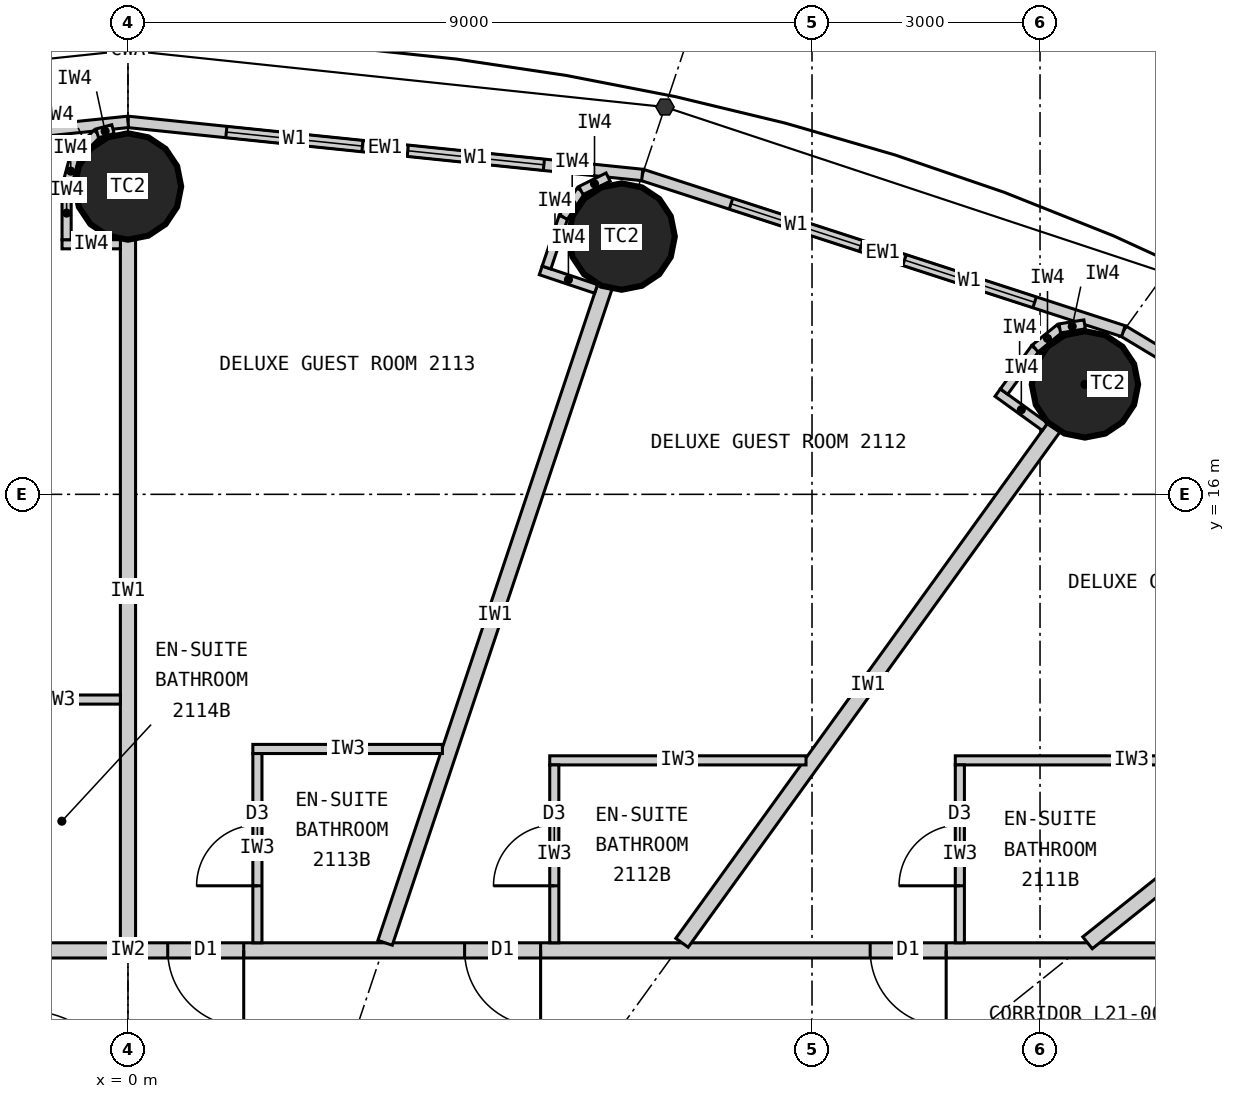
"""IFC4 building model, lengths in metres.
Left out: names, types, materials, properties, quantities, classifications, styles, units other than length and angle.
Written with IfcOpenShell. Run it as: python <this file> out.ifc"""

import sys

from ifc_helpers import new_model, si_unit, direction, frame, frame_2d, origin, origin_2d, place, context, subcontext, project, spatial, rectangle, circle, extrude, element, fill, save


model = new_model("IFC4")
c1 = context("Model", 3, precision=1e-05, world=origin(), true_north=direction((0.0, 1.0)))
c2 = subcontext(c1, "Body", "Model", "MODEL_VIEW")
j1 = project(units=[si_unit("LENGTHUNIT", "METRE"), si_unit("PLANEANGLEUNIT", "RADIAN")], contexts=[c1])
p1 = place(None, origin())
s1 = spatial("IfcSite", under=j1, at=p1, CompositionType="ELEMENT")
p2 = place(p1, origin())
s2 = spatial("IfcBuilding", under=s1, at=p2, CompositionType="ELEMENT")
p3 = place(p2, frame((0.0, 0.0, 83.7)))
s3 = spatial("IfcBuildingStorey", under=s2, at=p3, CompositionType="ELEMENT", Elevation=83.7)
for number, where, z_axis, x_axis in (
    (1, (12.591, 17.447, 0.0), (0.0, 0.0, 1.0), (1.0, 0.0, 0.0)),
    (2, (6.495, 19.391, 0.0), (0.0, 0.0, 1.0), (1.0, 0.0, 0.0)),
    (3, (0.0, 20.05, 0.0), (0.0, 0.0, 1.0), (1.0, 0.0, 0.0)),
):
    element("IfcColumn", number, at=place(p3, frame(where, z_axis=z_axis, x_axis=x_axis)), inside=s3, PredefinedType="COLUMN", context=c2, shape_type="SweptSolid", body=[
        extrude(circle(Radius=0.7, at=origin_2d()), origin(), (0.0, 0.0, 1.0), 3.3),
    ])
p4 = place(p3, frame((18.57, 14.856, 0.0), z_axis=(0.0, 0.0, 1.0), x_axis=(-0.856983180864, 0.515344377787, 0.0)))
e4 = element("IfcWall", 4, at=p4, inside=s3, PredefinedType="ELEMENTEDWALL", context=c2, shape_type="SweptSolid", body=[
    extrude(rectangle(XDim=6.386, YDim=0.15, at=frame_2d((3.193, 0.0))), origin(), (0.0, 0.0, 1.0), 3.12),
])
p5 = place(p4, frame((1.093, 0.0, 0.9)))
e5 = element("IfcOpeningElement", 5, at=p5, cuts=e4, PredefinedType="OPENING", context=c2, shape_type="SweptSolid", body=[
    extrude(rectangle(XDim=1.8, YDim=1.9, at=frame_2d((0.9, 0.95))), frame((0.0, 0.085, 0.0), z_axis=(0.0, -1.0, 0.0), x_axis=(1.0, 0.0, 0.0)), (0.0, 0.0, 1.0), 0.17),
])
p6 = place(p4, frame((3.493, 0.0, 0.9)))
e6 = element("IfcOpeningElement", 6, at=p6, cuts=e4, PredefinedType="OPENING", context=c2, shape_type="SweptSolid", body=[
    extrude(rectangle(XDim=1.8, YDim=1.9, at=frame_2d((0.9, 0.95))), frame((0.0, 0.085, 0.0), z_axis=(0.0, -1.0, 0.0), x_axis=(1.0, 0.0, 0.0)), (0.0, 0.0, 1.0), 0.17),
])
p7 = place(p3, frame((13.096, 18.147, 0.0), z_axis=(0.0, 0.0, 1.0), x_axis=(-0.951137534625, 0.308767534285, 0.0)))
e7 = element("IfcWall", 7, at=p7, inside=s3, PredefinedType="ELEMENTEDWALL", context=c2, shape_type="SweptSolid", body=[
    extrude(rectangle(XDim=6.655, YDim=0.15, at=frame_2d((3.328, 0.0))), origin(), (0.0, 0.0, 1.0), 3.12),
])
p8 = place(p7, frame((1.228, 0.0, 0.9)))
e8 = element("IfcOpeningElement", 8, at=p8, cuts=e7, PredefinedType="OPENING", context=c2, shape_type="SweptSolid", body=[
    extrude(rectangle(XDim=1.8, YDim=1.9, at=frame_2d((0.9, 0.95))), frame((0.0, 0.085, 0.0), z_axis=(0.0, -1.0, 0.0), x_axis=(1.0, 0.0, 0.0)), (0.0, 0.0, 1.0), 0.17),
])
p9 = place(p7, frame((3.628, 0.0, 0.9)))
e9 = element("IfcOpeningElement", 9, at=p9, cuts=e7, PredefinedType="OPENING", context=c2, shape_type="SweptSolid", body=[
    extrude(rectangle(XDim=1.8, YDim=1.9, at=frame_2d((0.9, 0.95))), frame((0.0, 0.085, 0.0), z_axis=(0.0, -1.0, 0.0), x_axis=(1.0, 0.0, 0.0)), (0.0, 0.0, 1.0), 0.17),
])
p10 = place(p3, frame((6.766, 20.202, 0.0), z_axis=(0.0, 0.0, 1.0), x_axis=(-0.994721394369, 0.102612609291, 0.0)))
e10 = element("IfcWall", 10, at=p10, inside=s3, PredefinedType="ELEMENTEDWALL", context=c2, shape_type="SweptSolid", body=[
    extrude(rectangle(XDim=6.802, YDim=0.15, at=frame_2d((3.401, 0.0))), origin(), (0.0, 0.0, 1.0), 3.12),
])
p11 = place(p10, frame((1.301, 0.0, 0.9)))
e11 = element("IfcOpeningElement", 11, at=p11, cuts=e10, PredefinedType="OPENING", context=c2, shape_type="SweptSolid", body=[
    extrude(rectangle(XDim=1.8, YDim=1.9, at=frame_2d((0.9, 0.95))), frame((0.0, 0.085, 0.0), z_axis=(0.0, -1.0, 0.0), x_axis=(1.0, 0.0, 0.0)), (0.0, 0.0, 1.0), 0.17),
])
p12 = place(p10, frame((3.701, 0.0, 0.9)))
e12 = element("IfcOpeningElement", 12, at=p12, cuts=e10, PredefinedType="OPENING", context=c2, shape_type="SweptSolid", body=[
    extrude(rectangle(XDim=1.8, YDim=1.9, at=frame_2d((0.9, 0.95))), frame((0.0, 0.085, 0.0), z_axis=(0.0, -1.0, 0.0), x_axis=(1.0, 0.0, 0.0)), (0.0, 0.0, 1.0), 0.17),
])
p13 = place(p3, frame((0.0, 20.9, 0.0), z_axis=(0.0, 0.0, 1.0), x_axis=(-0.994721394369, -0.102612609291, 0.0)))
e13 = element("IfcWall", 13, at=p13, inside=s3, PredefinedType="ELEMENTEDWALL", context=c2, shape_type="SweptSolid", body=[
    extrude(rectangle(XDim=6.802, YDim=0.15, at=frame_2d((3.401, 0.0))), origin(), (0.0, 0.0, 1.0), 3.12),
])
p14 = place(p13, frame((1.301, 0.0, 0.9)))
e14 = element("IfcOpeningElement", 14, at=p14, cuts=e13, PredefinedType="OPENING", context=c2, shape_type="SweptSolid", body=[
    extrude(rectangle(XDim=1.8, YDim=1.9, at=frame_2d((0.9, 0.95))), frame((0.0, 0.085, 0.0), z_axis=(0.0, -1.0, 0.0), x_axis=(1.0, 0.0, 0.0)), (0.0, 0.0, 1.0), 0.17),
])
p15 = place(p13, frame((3.701, 0.0, 0.9)))
e15 = element("IfcOpeningElement", 15, at=p15, cuts=e13, PredefinedType="OPENING", context=c2, shape_type="SweptSolid", body=[
    extrude(rectangle(XDim=1.8, YDim=1.9, at=frame_2d((0.9, 0.95))), frame((0.0, 0.085, 0.0), z_axis=(0.0, -1.0, 0.0), x_axis=(1.0, 0.0, 0.0)), (0.0, 0.0, 1.0), 0.17),
])
p16 = place(p3, frame((-14.1, 10.0, 0.0), z_axis=(0.0, 0.0, 1.0), x_axis=(1.0, 0.0, 0.0)))
e16 = element("IfcWall", 16, at=p16, inside=s3, PredefinedType="PARTITIONING", context=c2, shape_type="SweptSolid", body=[
    extrude(rectangle(XDim=28.2, YDim=0.2, at=frame_2d((14.1, 0.0))), origin(), (0.0, 0.0, 1.0), 3.12),
])
p17 = place(p16, frame((23.865, 0.0, 0.0)))
e17 = element("IfcOpeningElement", 17, at=p17, cuts=e16, PredefinedType="OPENING", context=c2, shape_type="SweptSolid", body=[
    extrude(rectangle(XDim=1.0, YDim=2.2, at=frame_2d((0.5, 1.1))), frame((0.0, 0.11, 0.0), z_axis=(0.0, -1.0, 0.0), x_axis=(1.0, 0.0, 0.0)), (0.0, 0.0, 1.0), 0.22),
])
p18 = place(p16, frame((18.529, 0.0, 0.0)))
e18 = element("IfcOpeningElement", 18, at=p18, cuts=e16, PredefinedType="OPENING", context=c2, shape_type="SweptSolid", body=[
    extrude(rectangle(XDim=1.0, YDim=2.2, at=frame_2d((0.5, 1.1))), frame((0.0, 0.11, 0.0), z_axis=(0.0, -1.0, 0.0), x_axis=(1.0, 0.0, 0.0)), (0.0, 0.0, 1.0), 0.22),
])
p19 = place(p16, frame((14.623, 0.0, 0.0)))
e19 = element("IfcOpeningElement", 19, at=p19, cuts=e16, PredefinedType="OPENING", context=c2, shape_type="SweptSolid", body=[
    extrude(rectangle(XDim=1.0, YDim=2.2, at=frame_2d((0.5, 1.1))), frame((0.0, 0.11, 0.0), z_axis=(0.0, -1.0, 0.0), x_axis=(1.0, 0.0, 0.0)), (0.0, 0.0, 1.0), 0.22),
])
p20 = place(p16, frame((11.24, 0.0, 0.0)))
e20 = element("IfcOpeningElement", 20, at=p20, cuts=e16, PredefinedType="OPENING", context=c2, shape_type="SweptSolid", body=[
    extrude(rectangle(XDim=1.0, YDim=2.2, at=frame_2d((0.5, 1.1))), frame((0.0, 0.11, 0.0), z_axis=(0.0, -1.0, 0.0), x_axis=(1.0, 0.0, 0.0)), (0.0, 0.0, 1.0), 0.22),
])
p21 = place(p16, frame((8.671, 0.0, 0.0)))
e21 = element("IfcOpeningElement", 21, at=p21, cuts=e16, PredefinedType="OPENING", context=c2, shape_type="SweptSolid", body=[
    extrude(rectangle(XDim=1.0, YDim=2.2, at=frame_2d((0.5, 1.1))), frame((0.0, 0.11, 0.0), z_axis=(0.0, -1.0, 0.0), x_axis=(1.0, 0.0, 0.0)), (0.0, 0.0, 1.0), 0.22),
])
p22 = place(p16, frame((2.801, 0.0, 0.0)))
e22 = element("IfcOpeningElement", 22, at=p22, cuts=e16, PredefinedType="OPENING", context=c2, shape_type="SweptSolid", body=[
    extrude(rectangle(XDim=1.0, YDim=2.2, at=frame_2d((0.5, 1.1))), frame((0.0, 0.11, 0.0), z_axis=(0.0, -1.0, 0.0), x_axis=(1.0, 0.0, 0.0)), (0.0, 0.0, 1.0), 0.22),
])
p23 = place(p3, frame((12.625, 10.1, 0.0), z_axis=(0.0, 0.0, 1.0), x_axis=(0.780892451574, 0.624665493744, 0.0)))
e23 = element("IfcWall", 23, at=p23, inside=s3, PredefinedType="PARTITIONING", context=c2, shape_type="SweptSolid", body=[
    extrude(rectangle(XDim=6.045, YDim=0.2, at=frame_2d((3.022, 0.0))), origin(), (0.0, 0.0, 1.0), 2.32),
])
p24 = place(p3, frame((7.289, 10.1, 0.0), z_axis=(0.0, 0.0, 1.0), x_axis=(0.585198353053, 0.810890182197, 0.0)))
e24 = element("IfcWall", 24, at=p24, inside=s3, PredefinedType="PARTITIONING", context=c2, shape_type="SweptSolid", body=[
    extrude(rectangle(XDim=8.36, YDim=0.2, at=frame_2d((4.18, 0.0))), origin(), (0.0, 0.0, 1.0), 2.32),
])
p25 = place(p3, frame((3.383, 10.1, 0.0), z_axis=(0.0, 0.0, 1.0), x_axis=(0.31759592231, 0.948226149256, 0.0)))
e25 = element("IfcWall", 25, at=p25, inside=s3, PredefinedType="PARTITIONING", context=c2, shape_type="SweptSolid", body=[
    extrude(rectangle(XDim=9.098, YDim=0.2, at=frame_2d((4.549, 0.0))), origin(), (0.0, 0.0, 1.0), 2.32),
])
p26 = place(p3, frame((0.0, 10.1, 0.0), z_axis=(0.0, 0.0, 1.0), x_axis=(0.0, 1.0, 0.0)))
e26 = element("IfcWall", 26, at=p26, inside=s3, PredefinedType="PARTITIONING", context=c2, shape_type="SweptSolid", body=[
    extrude(rectangle(XDim=9.25, YDim=0.2, at=frame_2d((4.625, 0.0))), origin(), (0.0, 0.0, 1.0), 2.32),
])
p27 = place(p3, frame((15.525, 12.5, 0.0), z_axis=(0.0, 0.0, 1.0), x_axis=(-1.0, 0.0, 0.0)))
e27 = element("IfcWall", 27, at=p27, inside=s3, PredefinedType="PARTITIONING", context=c2, shape_type="SweptSolid", body=[
    extrude(rectangle(XDim=4.64, YDim=0.12, at=frame_2d((2.32, 0.0))), origin(), (0.0, 0.0, 1.0), 3.12),
])
p28 = place(p3, frame((10.945, 10.1, 0.0), z_axis=(0.0, 0.0, 1.0), x_axis=(0.0, 1.0, 0.0)))
e28 = element("IfcWall", 28, at=p28, inside=s3, PredefinedType="PARTITIONING", context=c2, shape_type="SweptSolid", body=[
    extrude(rectangle(XDim=2.34, YDim=0.12, at=frame_2d((1.17, 0.0))), origin(), (0.0, 0.0, 1.0), 3.12),
])
p29 = place(p28, frame((0.75, 0.0, 0.0)))
e29 = element("IfcOpeningElement", 29, at=p29, cuts=e28, PredefinedType="OPENING", context=c2, shape_type="SweptSolid", body=[
    extrude(rectangle(XDim=0.8, YDim=2.1, at=frame_2d((0.4, 1.05))), frame((0.0, 0.07, 0.0), z_axis=(0.0, -1.0, 0.0), x_axis=(1.0, 0.0, 0.0)), (0.0, 0.0, 1.0), 0.14),
])
p30 = place(p3, frame((8.921, 12.5, 0.0), z_axis=(0.0, 0.0, 1.0), x_axis=(-1.0, 0.0, 0.0)))
e30 = element("IfcWall", 30, at=p30, inside=s3, PredefinedType="PARTITIONING", context=c2, shape_type="SweptSolid", body=[
    extrude(rectangle(XDim=3.372, YDim=0.12, at=frame_2d((1.686, 0.0))), origin(), (0.0, 0.0, 1.0), 3.12),
])
p31 = place(p3, frame((5.609, 10.1, 0.0), z_axis=(0.0, 0.0, 1.0), x_axis=(0.0, 1.0, 0.0)))
e31 = element("IfcWall", 31, at=p31, inside=s3, PredefinedType="PARTITIONING", context=c2, shape_type="SweptSolid", body=[
    extrude(rectangle(XDim=2.34, YDim=0.12, at=frame_2d((1.17, 0.0))), origin(), (0.0, 0.0, 1.0), 3.12),
])
p32 = place(p31, frame((0.75, 0.0, 0.0)))
e32 = element("IfcOpeningElement", 32, at=p32, cuts=e31, PredefinedType="OPENING", context=c2, shape_type="SweptSolid", body=[
    extrude(rectangle(XDim=0.8, YDim=2.1, at=frame_2d((0.4, 1.05))), frame((0.0, 0.07, 0.0), z_axis=(0.0, -1.0, 0.0), x_axis=(1.0, 0.0, 0.0)), (0.0, 0.0, 1.0), 0.14),
])
p33 = place(p3, frame((4.137, 12.65, 0.0), z_axis=(0.0, 0.0, 1.0), x_axis=(-1.0, 0.0, 0.0)))
e33 = element("IfcWall", 33, at=p33, inside=s3, PredefinedType="PARTITIONING", context=c2, shape_type="SweptSolid", body=[
    extrude(rectangle(XDim=2.494, YDim=0.12, at=frame_2d((1.247, 0.0))), origin(), (0.0, 0.0, 1.0), 3.12),
])
p34 = place(p3, frame((1.703, 10.1, 0.0), z_axis=(0.0, 0.0, 1.0), x_axis=(0.0, 1.0, 0.0)))
e34 = element("IfcWall", 34, at=p34, inside=s3, PredefinedType="PARTITIONING", context=c2, shape_type="SweptSolid", body=[
    extrude(rectangle(XDim=2.49, YDim=0.12, at=frame_2d((1.245, 0.0))), origin(), (0.0, 0.0, 1.0), 3.12),
])
p35 = place(p34, frame((0.75, 0.0, 0.0)))
e35 = element("IfcOpeningElement", 35, at=p35, cuts=e34, PredefinedType="OPENING", context=c2, shape_type="SweptSolid", body=[
    extrude(rectangle(XDim=0.8, YDim=2.1, at=frame_2d((0.4, 1.05))), frame((0.0, 0.07, 0.0), z_axis=(0.0, -1.0, 0.0), x_axis=(1.0, 0.0, 0.0)), (0.0, 0.0, 1.0), 0.14),
])
p36 = place(p3, frame((-0.1, 13.3, 0.0), z_axis=(0.0, 0.0, 1.0), x_axis=(-1.0, 0.0, 0.0)))
e36 = element("IfcWall", 36, at=p36, inside=s3, PredefinedType="PARTITIONING", context=c2, shape_type="SweptSolid", body=[
    extrude(rectangle(XDim=1.64, YDim=0.12, at=frame_2d((0.82, 0.0))), origin(), (0.0, 0.0, 1.0), 3.12),
])
p37 = place(p3, frame((12.065, 16.889, 0.0), z_axis=(0.0, 0.0, 1.0), x_axis=(-0.810821798253, 0.585293098778, 0.0)))
e37 = element("IfcWall", 37, at=p37, inside=s3, PredefinedType="PARTITIONING", context=c2, shape_type="SweptSolid", body=[
    extrude(rectangle(XDim=0.768, YDim=0.12, at=frame_2d((0.384, 0.0))), origin(), (0.0, 0.0, 1.0), 3.12),
])
p38 = place(p3, frame((11.526, 17.351, 0.0), z_axis=(0.0, 0.0, 1.0), x_axis=(0.585223113993, 0.810872312296, 0.0)))
e38 = element("IfcWall", 38, at=p38, inside=s3, PredefinedType="PARTITIONING", context=c2, shape_type="SweptSolid", body=[
    extrude(rectangle(XDim=0.7, YDim=0.12, at=frame_2d((0.35, 0.0))), origin(), (0.0, 0.0, 1.0), 3.12),
])
p39 = place(p3, frame((11.936, 17.919, 0.0), z_axis=(0.0, 0.0, 1.0), x_axis=(0.775023088441, 0.631932917629, 0.0)))
e39 = element("IfcWall", 39, at=p39, inside=s3, PredefinedType="PARTITIONING", context=c2, shape_type="SweptSolid", body=[
    extrude(rectangle(XDim=0.418, YDim=0.12, at=frame_2d((0.209, 0.0))), origin(), (0.0, 0.0, 1.0), 3.12),
])
p40 = place(p3, frame((12.26, 18.183, 0.0), z_axis=(0.0, 0.0, 1.0), x_axis=(0.987218661664, 0.159371622511, 0.0)))
e40 = element("IfcWall", 40, at=p40, inside=s3, PredefinedType="PARTITIONING", context=c2, shape_type="SweptSolid", body=[
    extrude(rectangle(XDim=0.331, YDim=0.12, at=frame_2d((0.166, 0.0))), origin(), (0.0, 0.0, 1.0), 3.12),
])
p41 = place(p3, frame((6.159, 18.702, 0.0), z_axis=(0.0, 0.0, 1.0), x_axis=(-0.948173154049, 0.31775410295, 0.0)))
e41 = element("IfcWall", 41, at=p41, inside=s3, PredefinedType="PARTITIONING", context=c2, shape_type="SweptSolid", body=[
    extrude(rectangle(XDim=0.768, YDim=0.12, at=frame_2d((0.384, 0.0))), origin(), (0.0, 0.0, 1.0), 3.12),
])
p42 = place(p3, frame((5.507, 18.984, 0.0), z_axis=(0.0, 0.0, 1.0), x_axis=(0.317692050622, 0.948193946918, 0.0)))
e42 = element("IfcWall", 42, at=p42, inside=s3, PredefinedType="PARTITIONING", context=c2, shape_type="SweptSolid", body=[
    extrude(rectangle(XDim=0.7, YDim=0.12, at=frame_2d((0.35, 0.0))), origin(), (0.0, 0.0, 1.0), 3.12),
])
p43 = place(p3, frame((5.729, 19.648, 0.0), z_axis=(0.0, 0.0, 1.0), x_axis=(0.552135764955, 0.833754218615, 0.0)))
e43 = element("IfcWall", 43, at=p43, inside=s3, PredefinedType="PARTITIONING", context=c2, shape_type="SweptSolid", body=[
    extrude(rectangle(XDim=0.418, YDim=0.12, at=frame_2d((0.209, 0.0))), origin(), (0.0, 0.0, 1.0), 3.12),
])
p44 = place(p3, frame((5.96, 19.996, 0.0), z_axis=(0.0, 0.0, 1.0), x_axis=(0.895160725913, 0.445743507842, 0.0)))
e44 = element("IfcWall", 44, at=p44, inside=s3, PredefinedType="PARTITIONING", context=c2, shape_type="SweptSolid", body=[
    extrude(rectangle(XDim=0.399, YDim=0.12, at=frame_2d((0.199, 0.0))), origin(), (0.0, 0.0, 1.0), 3.12),
])
p45 = place(p3, frame((-0.1, 19.29, 0.0), z_axis=(0.0, 0.0, 1.0), x_axis=(-1.0, 0.0, 0.0)))
e45 = element("IfcWall", 45, at=p45, inside=s3, PredefinedType="PARTITIONING", context=c2, shape_type="SweptSolid", body=[
    extrude(rectangle(XDim=0.767, YDim=0.12, at=frame_2d((0.384, 0.0))), origin(), (0.0, 0.0, 1.0), 3.12),
])
p46 = place(p3, frame((-0.808, 19.35, 0.0), z_axis=(0.0, 0.0, 1.0), x_axis=(0.0, 1.0, 0.0)))
e46 = element("IfcWall", 46, at=p46, inside=s3, PredefinedType="PARTITIONING", context=c2, shape_type="SweptSolid", body=[
    extrude(rectangle(XDim=0.7, YDim=0.12, at=frame_2d((0.35, 0.0))), origin(), (0.0, 0.0, 1.0), 3.12),
])
p47 = place(p3, frame((-0.808, 20.05, 0.0), z_axis=(0.0, 0.0, 1.0), x_axis=(0.2592614205, 0.965807183573, 0.0)))
e47 = element("IfcWall", 47, at=p47, inside=s3, PredefinedType="PARTITIONING", context=c2, shape_type="SweptSolid", body=[
    extrude(rectangle(XDim=0.418, YDim=0.12, at=frame_2d((0.209, 0.0))), origin(), (0.0, 0.0, 1.0), 3.12),
])
p48 = place(p3, frame((-0.699, 20.454, 0.0), z_axis=(0.0, 0.0, 1.0), x_axis=(0.707106781187, 0.707106781187, 0.0)))
e48 = element("IfcWall", 48, at=p48, inside=s3, PredefinedType="PARTITIONING", context=c2, shape_type="SweptSolid", body=[
    extrude(rectangle(XDim=0.418, YDim=0.12, at=frame_2d((0.209, 0.0))), origin(), (0.0, 0.0, 1.0), 3.12),
])
p49 = place(p3, frame((-0.404, 20.749, 0.0), z_axis=(0.0, 0.0, 1.0), x_axis=(0.965759066438, 0.25944060128, 0.0)))
e49 = element("IfcWall", 49, at=p49, inside=s3, PredefinedType="PARTITIONING", context=c2, shape_type="SweptSolid", body=[
    extrude(rectangle(XDim=0.214, YDim=0.12, at=frame_2d((0.107, 0.0))), origin(), (0.0, 0.0, 1.0), 3.12),
])
p50 = place(p8, origin())
e50 = element("IfcWindow", 50, at=p50, inside=s3, PartitioningType="SINGLE_PANEL", PredefinedType="WINDOW", context=c2, shape_type="SweptSolid", body=[
    extrude(rectangle(XDim=1.8, YDim=1.9, at=frame_2d((0.9, 0.95))), frame((0.0, 0.03, 0.0), z_axis=(0.0, -1.0, 0.0), x_axis=(1.0, 0.0, 0.0)), (0.0, 0.0, 1.0), 0.06),
])
fill(e8, e50)
p51 = place(p9, origin())
e51 = element("IfcWindow", 51, at=p51, inside=s3, PartitioningType="SINGLE_PANEL", PredefinedType="WINDOW", context=c2, shape_type="SweptSolid", body=[
    extrude(rectangle(XDim=1.8, YDim=1.9, at=frame_2d((0.9, 0.95))), frame((0.0, 0.03, 0.0), z_axis=(0.0, -1.0, 0.0), x_axis=(1.0, 0.0, 0.0)), (0.0, 0.0, 1.0), 0.06),
])
fill(e9, e51)
p52 = place(p11, origin())
e52 = element("IfcWindow", 52, at=p52, inside=s3, PartitioningType="SINGLE_PANEL", PredefinedType="WINDOW", context=c2, shape_type="SweptSolid", body=[
    extrude(rectangle(XDim=1.8, YDim=1.9, at=frame_2d((0.9, 0.95))), frame((0.0, 0.03, 0.0), z_axis=(0.0, -1.0, 0.0), x_axis=(1.0, 0.0, 0.0)), (0.0, 0.0, 1.0), 0.06),
])
fill(e11, e52)
p53 = place(p12, origin())
e53 = element("IfcWindow", 53, at=p53, inside=s3, PartitioningType="SINGLE_PANEL", PredefinedType="WINDOW", context=c2, shape_type="SweptSolid", body=[
    extrude(rectangle(XDim=1.8, YDim=1.9, at=frame_2d((0.9, 0.95))), frame((0.0, 0.03, 0.0), z_axis=(0.0, -1.0, 0.0), x_axis=(1.0, 0.0, 0.0)), (0.0, 0.0, 1.0), 0.06),
])
fill(e12, e53)
p54 = place(p29, origin())
e54 = element("IfcDoor", 54, at=p54, inside=s3, OperationType="SINGLE_SWING_LEFT", PredefinedType="DOOR", context=c2, shape_type="SweptSolid", body=[
    extrude(rectangle(XDim=0.8, YDim=2.1, at=frame_2d((0.4, 1.05))), frame((0.0, 0.025, 0.0), z_axis=(0.0, -1.0, 0.0), x_axis=(1.0, 0.0, 0.0)), (0.0, 0.0, 1.0), 0.05),
])
fill(e29, e54)
p55 = place(p17, origin())
e55 = element("IfcDoor", 55, at=p55, inside=s3, OperationType="SINGLE_SWING_RIGHT", PredefinedType="DOOR", context=c2, shape_type="SweptSolid", body=[
    extrude(rectangle(XDim=1.0, YDim=2.2, at=frame_2d((0.5, 1.1))), frame((0.0, 0.025, 0.0), z_axis=(0.0, -1.0, 0.0), x_axis=(1.0, 0.0, 0.0)), (0.0, 0.0, 1.0), 0.05),
])
fill(e17, e55)
p56 = place(p32, origin())
e56 = element("IfcDoor", 56, at=p56, inside=s3, OperationType="SINGLE_SWING_LEFT", PredefinedType="DOOR", context=c2, shape_type="SweptSolid", body=[
    extrude(rectangle(XDim=0.8, YDim=2.1, at=frame_2d((0.4, 1.05))), frame((0.0, 0.025, 0.0), z_axis=(0.0, -1.0, 0.0), x_axis=(1.0, 0.0, 0.0)), (0.0, 0.0, 1.0), 0.05),
])
fill(e32, e56)
p57 = place(p18, origin())
e57 = element("IfcDoor", 57, at=p57, inside=s3, OperationType="SINGLE_SWING_RIGHT", PredefinedType="DOOR", context=c2, shape_type="SweptSolid", body=[
    extrude(rectangle(XDim=1.0, YDim=2.2, at=frame_2d((0.5, 1.1))), frame((0.0, 0.025, 0.0), z_axis=(0.0, -1.0, 0.0), x_axis=(1.0, 0.0, 0.0)), (0.0, 0.0, 1.0), 0.05),
])
fill(e18, e57)
p58 = place(p35, origin())
e58 = element("IfcDoor", 58, at=p58, inside=s3, OperationType="SINGLE_SWING_LEFT", PredefinedType="DOOR", context=c2, shape_type="SweptSolid", body=[
    extrude(rectangle(XDim=0.8, YDim=2.1, at=frame_2d((0.4, 1.05))), frame((0.0, 0.025, 0.0), z_axis=(0.0, -1.0, 0.0), x_axis=(1.0, 0.0, 0.0)), (0.0, 0.0, 1.0), 0.05),
])
fill(e35, e58)
p59 = place(p19, origin())
e59 = element("IfcDoor", 59, at=p59, inside=s3, OperationType="SINGLE_SWING_RIGHT", PredefinedType="DOOR", context=c2, shape_type="SweptSolid", body=[
    extrude(rectangle(XDim=1.0, YDim=2.2, at=frame_2d((0.5, 1.1))), frame((0.0, 0.025, 0.0), z_axis=(0.0, -1.0, 0.0), x_axis=(1.0, 0.0, 0.0)), (0.0, 0.0, 1.0), 0.05),
])
fill(e19, e59)
save(model, sys.argv[1])
